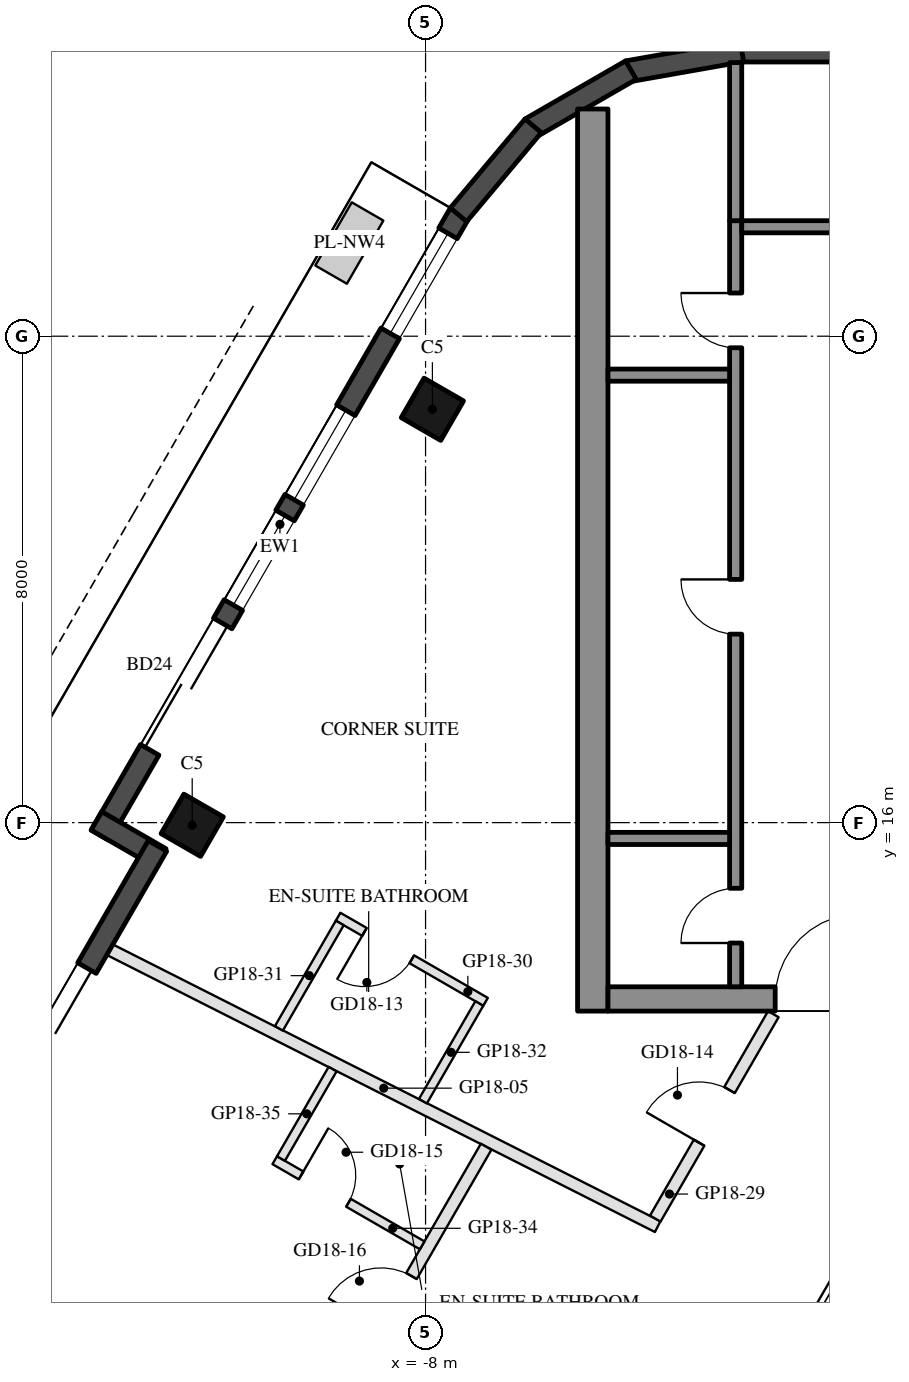
"""IFC4 building model, lengths in metres.
Left out: names, types, materials, properties, quantities, classifications, styles, units other than length and angle.
Written with IfcOpenShell. Run it as: python <this file> out.ifc"""

import sys

from ifc_helpers import new_model, si_unit, direction, frame, frame_2d, origin, origin_2d, place, context, subcontext, project, spatial, rectangle, hollow_rectangle, extrude, element, fill, save


model = new_model("IFC4")
c1 = context("Model", 3, precision=1e-05, world=origin(), true_north=direction((0.0, 1.0)))
c2 = subcontext(c1, "Body", "Model", "MODEL_VIEW")
j1 = project(units=[si_unit("LENGTHUNIT", "METRE"), si_unit("PLANEANGLEUNIT", "RADIAN")], contexts=[c1])
p1 = place(None, origin())
s1 = spatial("IfcSite", under=j1, at=p1, CompositionType="ELEMENT")
p2 = place(p1, origin())
s2 = spatial("IfcBuilding", under=s1, at=p2, CompositionType="ELEMENT")
p3 = place(p2, frame((0.0, 0.0, 194.7)))
s3 = spatial("IfcBuildingStorey", under=s2, at=p3, CompositionType="ELEMENT", Elevation=194.7)
for number, where, z_axis, x_axis in (
    (1, (-7.888, 22.798, 0.0), (0.0, 0.0, 1.0), (0.5, 0.866, 0.0)),
    (2, (-11.838, 15.957, 0.0), (0.0, 0.0, 1.0), (0.5, 0.866, 0.0)),
):
    element("IfcColumn", number, at=place(p3, frame(where, z_axis=z_axis, x_axis=x_axis)), inside=s3, PredefinedType="COLUMN", context=c2, shape_type="SweptSolid", body=[
        extrude(hollow_rectangle(XDim=0.75, YDim=0.75, WallThickness=0.035, at=origin_2d()), origin(), (0.0, 0.0, 1.0), 3.7),
    ])
p4 = place(p3, frame((-7.441, 26.022, 0.0), z_axis=(0.0, 0.0, 1.0), x_axis=(-0.499992533062, -0.86602971478, 0.0)))
e3 = element("IfcWall", 3, at=p4, inside=s3, PredefinedType="SOLIDWALL", context=c2, shape_type="SweptSolid", body=[
    extrude(rectangle(XDim=11.816, YDim=0.35, at=frame_2d((5.908, 0.0))), origin(), (0.0, 0.0, 1.0), 3.55),
])
p5 = place(p4, frame((0.381, 0.0, 0.3)))
e4 = element("IfcOpeningElement", 4, at=p5, cuts=e3, PredefinedType="OPENING", context=c2, shape_type="SweptSolid", body=[
    extrude(rectangle(XDim=1.9, YDim=2.65, at=frame_2d((0.95, 1.325))), frame((0.0, 0.185, 0.0), z_axis=(0.0, -1.0, 0.0), x_axis=(1.0, 0.0, 0.0)), (0.0, 0.0, 1.0), 0.37),
])
p6 = place(p4, frame((7.791, 0.0, 0.0)))
e5 = element("IfcOpeningElement", 5, at=p6, cuts=e3, PredefinedType="OPENING", context=c2, shape_type="SweptSolid", body=[
    extrude(rectangle(XDim=2.4, YDim=2.4, at=frame_2d((1.2, 1.2))), frame((0.0, 0.185, 0.0), z_axis=(0.0, -1.0, 0.0), x_axis=(1.0, 0.0, 0.0)), (0.0, 0.0, 1.0), 0.37),
])
p7 = place(p4, frame((3.741, 0.0, 0.3)))
e6 = element("IfcOpeningElement", 6, at=p7, cuts=e3, PredefinedType="OPENING", context=c2, shape_type="SweptSolid", body=[
    extrude(rectangle(XDim=1.7, YDim=2.65, at=frame_2d((0.85, 1.325))), frame((0.0, 0.185, 0.0), z_axis=(0.0, -1.0, 0.0), x_axis=(1.0, 0.0, 0.0)), (0.0, 0.0, 1.0), 0.37),
])
p8 = place(p4, frame((5.741, 0.0, 0.3)))
e7 = element("IfcOpeningElement", 7, at=p8, cuts=e3, PredefinedType="OPENING", context=c2, shape_type="SweptSolid", body=[
    extrude(rectangle(XDim=1.7, YDim=2.65, at=frame_2d((0.85, 1.325))), frame((0.0, 0.185, 0.0), z_axis=(0.0, -1.0, 0.0), x_axis=(1.0, 0.0, 0.0)), (0.0, 0.0, 1.0), 0.37),
])
p9 = place(p3, frame((-13.413, 16.029, 0.0), z_axis=(0.0, 0.0, 1.0), x_axis=(0.866005645448, -0.500034220881, 0.0)))
e8 = element("IfcWall", 8, at=p9, inside=s3, PredefinedType="SOLIDWALL", context=c2, shape_type="SweptSolid", body=[
    extrude(rectangle(XDim=1.22, YDim=0.35, at=frame_2d((0.61, 0.0))), origin(), (0.0, 0.0, 1.0), 3.55),
])
p10 = place(p3, frame((-12.409, 15.617, 0.0), z_axis=(0.0, 0.0, 1.0), x_axis=(-0.500003597184, -0.866023326939, 0.0)))
e9 = element("IfcWall", 9, at=p10, inside=s3, PredefinedType="SOLIDWALL", context=c2, shape_type="SweptSolid", body=[
    extrude(rectangle(XDim=6.74, YDim=0.35, at=frame_2d((3.37, 0.0))), origin(), (0.0, 0.0, 1.0), 3.55),
])
p11 = place(p10, frame((2.32, 0.0, 0.0)))
e10 = element("IfcOpeningElement", 10, at=p11, cuts=e9, PredefinedType="OPENING", context=c2, shape_type="SweptSolid", body=[
    extrude(rectangle(XDim=2.4, YDim=2.4, at=frame_2d((1.2, 1.2))), frame((0.0, 0.185, 0.0), z_axis=(0.0, -1.0, 0.0), x_axis=(1.0, 0.0, 0.0)), (0.0, 0.0, 1.0), 0.37),
])
p12 = place(p10, frame((5.02, 0.0, 0.3)))
e11 = element("IfcOpeningElement", 11, at=p12, cuts=e9, PredefinedType="OPENING", context=c2, shape_type="SweptSolid", body=[
    extrude(rectangle(XDim=0.9, YDim=2.65, at=frame_2d((0.45, 1.325))), frame((0.0, 0.185, 0.0), z_axis=(0.0, -1.0, 0.0), x_axis=(1.0, 0.0, 0.0)), (0.0, 0.0, 1.0), 0.37),
])
p13 = place(p3, frame((2.829, 28.685, 0.0), z_axis=(0.0, 0.0, 1.0), x_axis=(-1.0, 0.0, 0.0)))
e12 = element("IfcWall", 12, at=p13, inside=s3, PredefinedType="SOLIDWALL", context=c2, shape_type="SweptSolid", body=[
    extrude(rectangle(XDim=5.658, YDim=0.35, at=frame_2d((2.829, 0.0))), origin(), (0.0, 0.0, 1.0), 3.55),
])
for number, where, z_axis, x_axis in (
    (13, (-2.799, 28.688, 0.0), (0.0, 0.0, 1.0), (-0.985, -0.174, 0.0)),
    (14, (-4.623, 28.377, 0.0), (0.0, 0.0, 1.0), (-0.866, -0.5, 0.0)),
):
    element("IfcWall", number, at=place(p3, frame(where, z_axis=z_axis, x_axis=x_axis)), inside=s3, PredefinedType="SOLIDWALL", context=c2, shape_type="SweptSolid", body=[
        extrude(rectangle(XDim=1.91, YDim=0.35, at=frame_2d((0.955, 0.0))), origin(), (0.0, 0.0, 1.0), 3.55),
    ])
p14 = place(p3, frame((-6.23, 27.461, 0.0), z_axis=(0.0, 0.0, 1.0), x_axis=(-0.642808304945, -0.766027077259, 0.0)))
e15 = element("IfcWall", 15, at=p14, inside=s3, PredefinedType="SOLIDWALL", context=c2, shape_type="SweptSolid", body=[
    extrude(rectangle(XDim=1.91, YDim=0.35, at=frame_2d((0.955, 0.0))), origin(), (0.0, 0.0, 1.0), 3.55),
])
p15 = place(p3, frame((-5.25, 12.9, 0.0), z_axis=(0.0, 0.0, 1.0), x_axis=(0.0, 1.0, 0.0)))
e16 = element("IfcWall", 16, at=p15, inside=s3, PredefinedType="SHEAR", context=c2, shape_type="SweptSolid", body=[
    extrude(rectangle(XDim=14.837, YDim=0.5, at=frame_2d((7.418, 0.0))), origin(), (0.0, 0.0, 1.0), 3.5),
])
p16 = place(p3, frame((5.0, 13.1, 0.0), z_axis=(0.0, 0.0, 1.0), x_axis=(-1.0, 0.0, 0.0)))
e17 = element("IfcWall", 17, at=p16, inside=s3, PredefinedType="SHEAR", context=c2, shape_type="SweptSolid", body=[
    extrude(rectangle(XDim=10.0, YDim=0.4, at=frame_2d((5.0, 0.0))), origin(), (0.0, 0.0, 1.0), 3.5),
])
p17 = place(p16, frame((3.55, 0.0, 0.0)))
e18 = element("IfcOpeningElement", 18, at=p17, cuts=e17, PredefinedType="OPENING", context=c2, shape_type="SweptSolid", body=[
    extrude(rectangle(XDim=1.1, YDim=2.1, at=frame_2d((0.55, 1.05))), frame((0.0, 0.21, 0.0), z_axis=(0.0, -1.0, 0.0), x_axis=(1.0, 0.0, 0.0)), (0.0, 0.0, 1.0), 0.42),
])
p18 = place(p16, frame((5.85, 0.0, 0.0)))
e19 = element("IfcOpeningElement", 19, at=p18, cuts=e17, PredefinedType="OPENING", context=c2, shape_type="SweptSolid", body=[
    extrude(rectangle(XDim=1.4, YDim=2.1, at=frame_2d((0.7, 1.05))), frame((0.0, 0.21, 0.0), z_axis=(0.0, -1.0, 0.0), x_axis=(1.0, 0.0, 0.0)), (0.0, 0.0, 1.0), 0.42),
])
p19 = place(p3, frame((-2.9, 13.3, 0.0), z_axis=(0.0, 0.0, 1.0), x_axis=(0.0, 1.0, 0.0)))
e20 = element("IfcWall", 20, at=p19, inside=s3, PredefinedType="SHEAR", context=c2, shape_type="SweptSolid", body=[
    extrude(rectangle(XDim=12.6, YDim=0.2, at=frame_2d((6.3, 0.0))), origin(), (0.0, 0.0, 1.0), 3.5),
])
p20 = place(p19, frame((0.72, 0.0, 0.0)))
e21 = element("IfcOpeningElement", 21, at=p20, cuts=e20, PredefinedType="OPENING", context=c2, shape_type="SweptSolid", body=[
    extrude(rectangle(XDim=0.9, YDim=2.1, at=frame_2d((0.45, 1.05))), frame((0.0, 0.11, 0.0), z_axis=(0.0, -1.0, 0.0), x_axis=(1.0, 0.0, 0.0)), (0.0, 0.0, 1.0), 0.22),
])
p21 = place(p19, frame((5.8, 0.0, 0.0)))
e22 = element("IfcOpeningElement", 22, at=p21, cuts=e20, PredefinedType="OPENING", context=c2, shape_type="SweptSolid", body=[
    extrude(rectangle(XDim=0.9, YDim=2.1, at=frame_2d((0.45, 1.05))), frame((0.0, 0.11, 0.0), z_axis=(0.0, -1.0, 0.0), x_axis=(1.0, 0.0, 0.0)), (0.0, 0.0, 1.0), 0.22),
])
p22 = place(p19, frame((10.51, 0.0, 0.0)))
e23 = element("IfcOpeningElement", 23, at=p22, cuts=e20, PredefinedType="OPENING", context=c2, shape_type="SweptSolid", body=[
    extrude(rectangle(XDim=0.9, YDim=2.1, at=frame_2d((0.45, 1.05))), frame((0.0, 0.11, 0.0), z_axis=(0.0, -1.0, 0.0), x_axis=(1.0, 0.0, 0.0)), (0.0, 0.0, 1.0), 0.22),
])
p23 = place(p3, frame((-0.4, 25.8, 0.0), z_axis=(0.0, 0.0, 1.0), x_axis=(-1.0, 0.0, 0.0)))
e24 = element("IfcWall", 24, at=p23, inside=s3, PredefinedType="SHEAR", context=c2, shape_type="SweptSolid", body=[
    extrude(rectangle(XDim=2.4, YDim=0.2, at=frame_2d((1.2, 0.0))), origin(), (0.0, 0.0, 1.0), 3.5),
])
for number, where, z_axis, x_axis in (
    (25, (-3.0, 15.74, 0.0), (0.0, 0.0, 1.0), (-1.0, 0.0, 0.0)),
    (26, (-3.0, 23.36, 0.0), (0.0, 0.0, 1.0), (-1.0, 0.0, 0.0)),
):
    element("IfcWall", number, at=place(p3, frame(where, z_axis=z_axis, x_axis=x_axis)), inside=s3, PredefinedType="SHEAR", context=c2, shape_type="SweptSolid", body=[
        extrude(rectangle(XDim=2.0, YDim=0.2, at=frame_2d((1.0, 0.0))), origin(), (0.0, 0.0, 1.0), 3.5),
    ])
p24 = place(p3, frame((-2.9, 25.9, 0.0), z_axis=(0.0, 0.0, 1.0), x_axis=(0.0, 1.0, 0.0)))
e27 = element("IfcWall", 27, at=p24, inside=s3, PredefinedType="SHEAR", context=c2, shape_type="SweptSolid", body=[
    extrude(rectangle(XDim=2.6, YDim=0.2, at=frame_2d((1.3, 0.0))), origin(), (0.0, 0.0, 1.0), 3.5),
])
p25 = place(p3, frame((-13.192, 13.91, 0.0), z_axis=(0.0, 0.0, 1.0), x_axis=(0.892469554868, -0.451107629766, 0.0)))
e28 = element("IfcWall", 28, at=p25, inside=s3, PredefinedType="PARTITIONING", context=c2, shape_type="SweptSolid", body=[
    extrude(rectangle(XDim=10.096, YDim=0.2, at=frame_2d((5.048, 0.0))), origin(), (0.0, 0.0, 1.0), 3.06),
])
p26 = place(p3, frame((-4.222, 9.488, 0.0), z_axis=(0.0, 0.0, 1.0), x_axis=(0.49998736472, 0.866032698644, 0.0)))
e29 = element("IfcWall", 29, at=p26, inside=s3, PredefinedType="PARTITIONING", context=c2, shape_type="SweptSolid", body=[
    extrude(rectangle(XDim=3.882, YDim=0.2, at=frame_2d((1.941, 0.0))), origin(), (0.0, 0.0, 1.0), 2.95),
])
p27 = place(p26, frame((1.441, 0.0, 0.0)))
e30 = element("IfcOpeningElement", 30, at=p27, cuts=e29, PredefinedType="OPENING", context=c2, shape_type="SweptSolid", body=[
    extrude(rectangle(XDim=1.0, YDim=2.1, at=frame_2d((0.5, 1.05))), frame((0.0, 0.11, 0.0), z_axis=(0.0, -1.0, 0.0), x_axis=(1.0, 0.0, 0.0)), (0.0, 0.0, 1.0), 0.22),
])
p28 = place(p3, frame((-7.013, 13.052, 0.0), z_axis=(0.0, 0.0, 1.0), x_axis=(-0.866034573852, 0.49998411664, 0.0)))
e31 = element("IfcWall", 31, at=p28, inside=s3, PredefinedType="PARTITIONING", context=c2, shape_type="SweptSolid", body=[
    extrude(rectangle(XDim=2.8, YDim=0.15, at=frame_2d((1.4, 0.0))), origin(), (0.0, 0.0, 1.0), 2.95),
])
p29 = place(p28, frame((1.4, 0.0, 0.0)))
e32 = element("IfcOpeningElement", 32, at=p29, cuts=e31, PredefinedType="OPENING", context=c2, shape_type="SweptSolid", body=[
    extrude(rectangle(XDim=0.9, YDim=2.1, at=frame_2d((0.45, 1.05))), frame((0.0, 0.085, 0.0), z_axis=(0.0, -1.0, 0.0), x_axis=(1.0, 0.0, 0.0)), (0.0, 0.0, 1.0), 0.17),
])
p30 = place(p3, frame((-9.411, 14.35, 0.0), z_axis=(0.0, 0.0, 1.0), x_axis=(-0.499982900776, -0.866035275801, 0.0)))
e33 = element("IfcWall", 33, at=p30, inside=s3, PredefinedType="PARTITIONING", context=c2, shape_type="SweptSolid", body=[
    extrude(rectangle(XDim=2.001, YDim=0.15, at=frame_2d((1.001, 0.0))), origin(), (0.0, 0.0, 1.0), 3.55),
])
p31 = place(p3, frame((-7.116, 13.025, 0.0), z_axis=(0.0, 0.0, 1.0), x_axis=(-0.4999770169, -0.866038672677, 0.0)))
e34 = element("IfcWall", 34, at=p31, inside=s3, PredefinedType="PARTITIONING", context=c2, shape_type="SweptSolid", body=[
    extrude(rectangle(XDim=1.854, YDim=0.15, at=frame_2d((0.927, 0.0))), origin(), (0.0, 0.0, 1.0), 3.55),
])
p32 = place(p3, frame((-11.962, 2.081, 0.0), z_axis=(0.0, 0.0, 1.0), x_axis=(0.500007290723, 0.866021194443, 0.0)))
e35 = element("IfcWall", 35, at=p32, inside=s3, PredefinedType="PARTITIONING", context=c2, shape_type="SweptSolid", body=[
    extrude(rectangle(XDim=9.917, YDim=0.2, at=frame_2d((4.958, 0.0))), origin(), (0.0, 0.0, 1.0), 2.95),
])
p33 = place(p32, frame((6.462, 0.0, 0.0)))
e36 = element("IfcOpeningElement", 36, at=p33, cuts=e35, PredefinedType="OPENING", context=c2, shape_type="SweptSolid", body=[
    extrude(rectangle(XDim=1.0, YDim=2.1, at=frame_2d((0.5, 1.05))), frame((0.0, 0.11, 0.0), z_axis=(0.0, -1.0, 0.0), x_axis=(1.0, 0.0, 0.0)), (0.0, 0.0, 1.0), 0.22),
])
p34 = place(p3, frame((-10.48, 10.448, 0.0), z_axis=(0.0, 0.0, 1.0), x_axis=(0.865996816683, -0.500049511043, 0.0)))
e37 = element("IfcWall", 37, at=p34, inside=s3, PredefinedType="PARTITIONING", context=c2, shape_type="SweptSolid", body=[
    extrude(rectangle(XDim=2.8, YDim=0.15, at=frame_2d((1.4, 0.0))), origin(), (0.0, 0.0, 1.0), 2.95),
])
p35 = place(p34, frame((0.5, 0.0, 0.0)))
e38 = element("IfcOpeningElement", 38, at=p35, cuts=e37, PredefinedType="OPENING", context=c2, shape_type="SweptSolid", body=[
    extrude(rectangle(XDim=0.9, YDim=2.1, at=frame_2d((0.45, 1.05))), frame((0.0, 0.085, 0.0), z_axis=(0.0, -1.0, 0.0), x_axis=(1.0, 0.0, 0.0)), (0.0, 0.0, 1.0), 0.17),
])
p36 = place(p3, frame((-9.529, 11.946, 0.0), z_axis=(0.0, 0.0, 1.0), x_axis=(-0.499942281444, -0.866058725044, 0.0)))
e39 = element("IfcWall", 39, at=p36, inside=s3, PredefinedType="PARTITIONING", context=c2, shape_type="SweptSolid", body=[
    extrude(rectangle(XDim=1.698, YDim=0.15, at=frame_2d((0.849, 0.0))), origin(), (0.0, 0.0, 1.0), 2.95),
])
p37 = place(p5, origin())
e40 = element("IfcWindow", 40, at=p37, inside=s3, PartitioningType="SINGLE_PANEL", PredefinedType="WINDOW", context=c2, shape_type="SweptSolid", body=[
    extrude(rectangle(XDim=1.9, YDim=2.65, at=frame_2d((0.95, 1.325))), frame((0.0, 0.03, 0.0), z_axis=(0.0, -1.0, 0.0), x_axis=(1.0, 0.0, 0.0)), (0.0, 0.0, 1.0), 0.06),
])
fill(e4, e40)
p38 = place(p6, frame((2.4, 0.0, 0.0), z_axis=(0.0, 0.0, 1.0), x_axis=(-1.0, 0.0, 0.0)))
e41 = element("IfcDoor", 41, at=p38, inside=s3, OperationType="SLIDING_TO_LEFT", PredefinedType="DOOR", context=c2, shape_type="SweptSolid", body=[
    extrude(rectangle(XDim=2.4, YDim=2.4, at=frame_2d((1.2, 1.2))), frame((0.0, 0.025, 0.0), z_axis=(0.0, -1.0, 0.0), x_axis=(1.0, 0.0, 0.0)), (0.0, 0.0, 1.0), 0.05),
])
fill(e5, e41)
p39 = place(p7, origin())
e42 = element("IfcWindow", 42, at=p39, inside=s3, PartitioningType="SINGLE_PANEL", PredefinedType="WINDOW", context=c2, shape_type="SweptSolid", body=[
    extrude(rectangle(XDim=1.7, YDim=2.65, at=frame_2d((0.85, 1.325))), frame((0.0, 0.03, 0.0), z_axis=(0.0, -1.0, 0.0), x_axis=(1.0, 0.0, 0.0)), (0.0, 0.0, 1.0), 0.06),
])
fill(e6, e42)
p40 = place(p8, origin())
e43 = element("IfcWindow", 43, at=p40, inside=s3, PartitioningType="SINGLE_PANEL", PredefinedType="WINDOW", context=c2, shape_type="SweptSolid", body=[
    extrude(rectangle(XDim=1.7, YDim=2.65, at=frame_2d((0.85, 1.325))), frame((0.0, 0.03, 0.0), z_axis=(0.0, -1.0, 0.0), x_axis=(1.0, 0.0, 0.0)), (0.0, 0.0, 1.0), 0.06),
])
fill(e7, e43)
p41 = place(p11, frame((2.4, 0.0, 0.0), z_axis=(0.0, 0.0, 1.0), x_axis=(-1.0, 0.0, 0.0)))
e44 = element("IfcDoor", 44, at=p41, inside=s3, OperationType="SLIDING_TO_LEFT", PredefinedType="DOOR", context=c2, shape_type="SweptSolid", body=[
    extrude(rectangle(XDim=2.4, YDim=2.4, at=frame_2d((1.2, 1.2))), frame((0.0, 0.025, 0.0), z_axis=(0.0, -1.0, 0.0), x_axis=(1.0, 0.0, 0.0)), (0.0, 0.0, 1.0), 0.05),
])
fill(e10, e44)
p42 = place(p20, origin())
e45 = element("IfcDoor", 45, at=p42, inside=s3, OperationType="SINGLE_SWING_LEFT", PredefinedType="DOOR", context=c2, shape_type="SweptSolid", body=[
    extrude(rectangle(XDim=0.9, YDim=2.1, at=frame_2d((0.45, 1.05))), frame((0.0, 0.025, 0.0), z_axis=(0.0, -1.0, 0.0), x_axis=(1.0, 0.0, 0.0)), (0.0, 0.0, 1.0), 0.05),
])
fill(e21, e45)
p43 = place(p21, origin())
e46 = element("IfcDoor", 46, at=p43, inside=s3, OperationType="SINGLE_SWING_RIGHT", PredefinedType="DOOR", context=c2, shape_type="SweptSolid", body=[
    extrude(rectangle(XDim=0.9, YDim=2.1, at=frame_2d((0.45, 1.05))), frame((0.0, 0.025, 0.0), z_axis=(0.0, -1.0, 0.0), x_axis=(1.0, 0.0, 0.0)), (0.0, 0.0, 1.0), 0.05),
])
fill(e22, e46)
p44 = place(p22, origin())
e47 = element("IfcDoor", 47, at=p44, inside=s3, OperationType="SINGLE_SWING_RIGHT", PredefinedType="DOOR", context=c2, shape_type="SweptSolid", body=[
    extrude(rectangle(XDim=0.9, YDim=2.1, at=frame_2d((0.45, 1.05))), frame((0.0, 0.025, 0.0), z_axis=(0.0, -1.0, 0.0), x_axis=(1.0, 0.0, 0.0)), (0.0, 0.0, 1.0), 0.05),
])
fill(e23, e47)
p45 = place(p18, frame((1.4, 0.0, 0.0), z_axis=(0.0, 0.0, 1.0), x_axis=(-1.0, 0.0, 0.0)))
e48 = element("IfcDoor", 48, at=p45, inside=s3, OperationType="DOUBLE_DOOR_SINGLE_SWING", PredefinedType="DOOR", context=c2, shape_type="SweptSolid", body=[
    extrude(rectangle(XDim=1.4, YDim=2.1, at=frame_2d((0.7, 1.05))), frame((0.0, 0.025, 0.0), z_axis=(0.0, -1.0, 0.0), x_axis=(1.0, 0.0, 0.0)), (0.0, 0.0, 1.0), 0.05),
])
fill(e19, e48)
p46 = place(p29, origin())
e49 = element("IfcDoor", 49, at=p46, inside=s3, OperationType="SINGLE_SWING_RIGHT", PredefinedType="DOOR", context=c2, shape_type="SweptSolid", body=[
    extrude(rectangle(XDim=0.9, YDim=2.1, at=frame_2d((0.45, 1.05))), frame((0.0, 0.025, 0.0), z_axis=(0.0, -1.0, 0.0), x_axis=(1.0, 0.0, 0.0)), (0.0, 0.0, 1.0), 0.05),
])
fill(e32, e49)
p47 = place(p27, origin())
e50 = element("IfcDoor", 50, at=p47, inside=s3, OperationType="SINGLE_SWING_LEFT", PredefinedType="DOOR", context=c2, shape_type="SweptSolid", body=[
    extrude(rectangle(XDim=1.0, YDim=2.1, at=frame_2d((0.5, 1.05))), frame((0.0, 0.025, 0.0), z_axis=(0.0, -1.0, 0.0), x_axis=(1.0, 0.0, 0.0)), (0.0, 0.0, 1.0), 0.05),
])
fill(e30, e50)
p48 = place(p35, origin())
e51 = element("IfcDoor", 51, at=p48, inside=s3, OperationType="SINGLE_SWING_LEFT", PredefinedType="DOOR", context=c2, shape_type="SweptSolid", body=[
    extrude(rectangle(XDim=0.9, YDim=2.1, at=frame_2d((0.45, 1.05))), frame((0.0, 0.025, 0.0), z_axis=(0.0, -1.0, 0.0), x_axis=(1.0, 0.0, 0.0)), (0.0, 0.0, 1.0), 0.05),
])
fill(e38, e51)
p49 = place(p33, origin())
e52 = element("IfcDoor", 52, at=p49, inside=s3, OperationType="SINGLE_SWING_LEFT", PredefinedType="DOOR", context=c2, shape_type="SweptSolid", body=[
    extrude(rectangle(XDim=1.0, YDim=2.1, at=frame_2d((0.5, 1.05))), frame((0.0, 0.025, 0.0), z_axis=(0.0, -1.0, 0.0), x_axis=(1.0, 0.0, 0.0)), (0.0, 0.0, 1.0), 0.05),
])
fill(e36, e52)
save(model, sys.argv[1])
